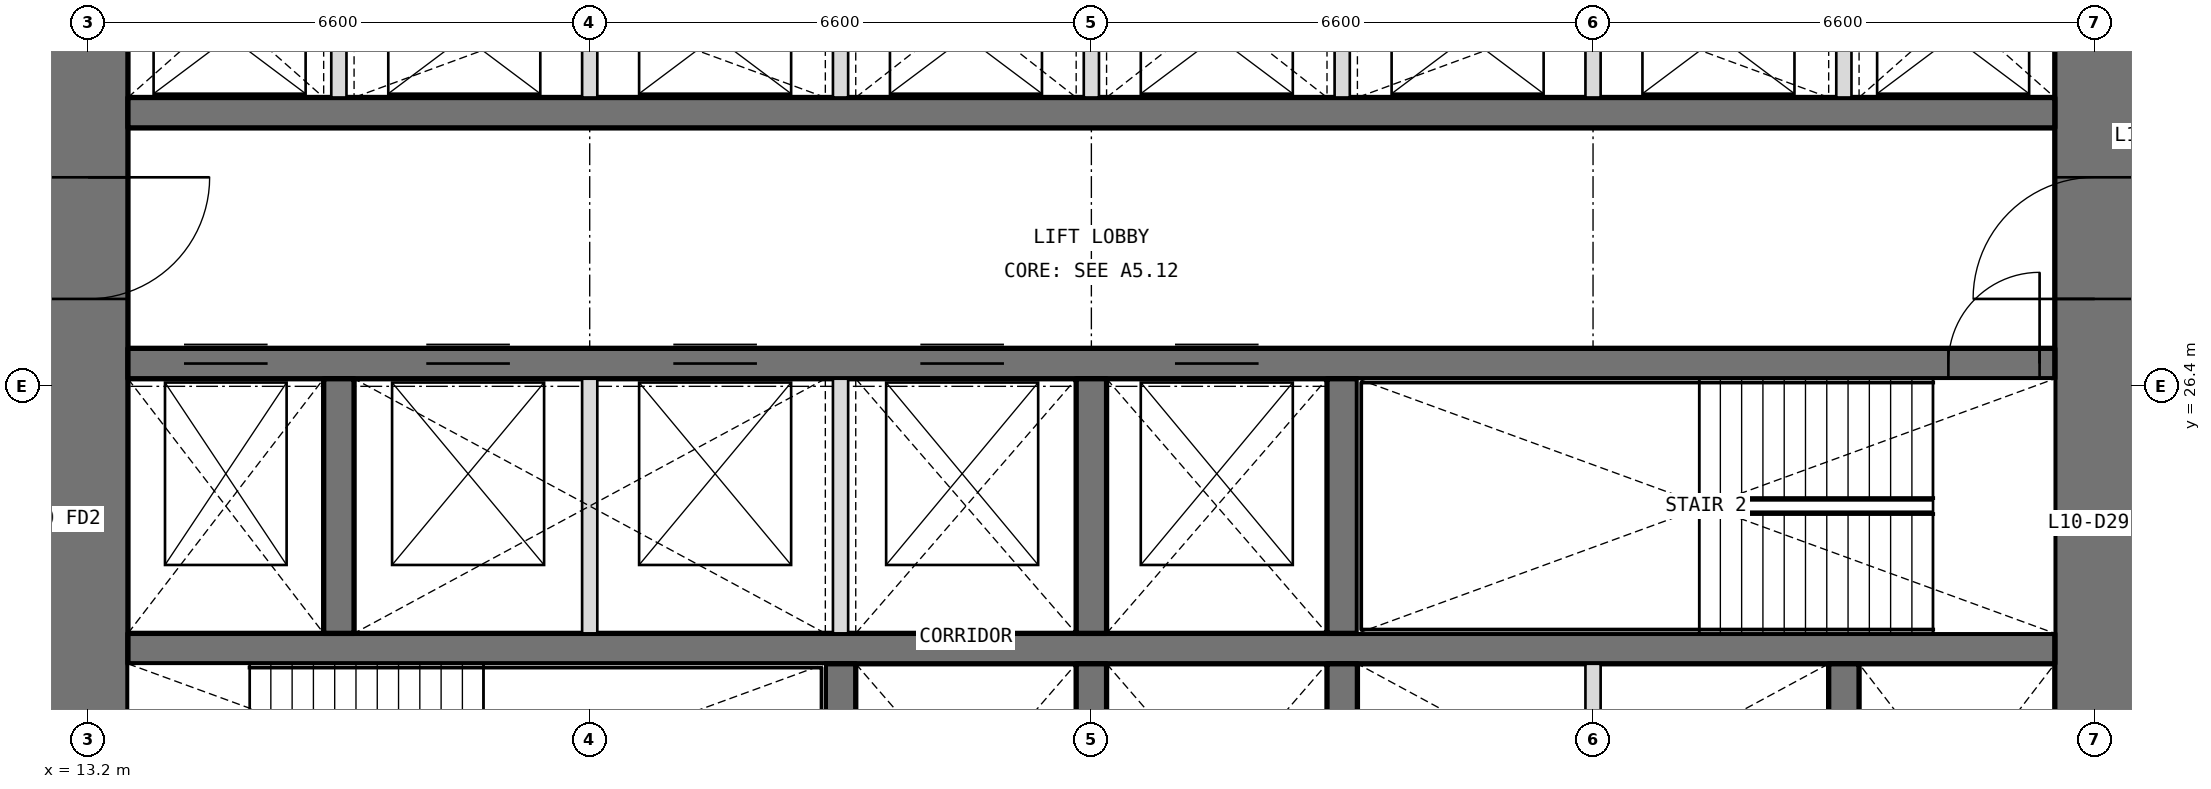
"""IFC4 building model, lengths in metres.
Left out: names, types, materials, properties, quantities, classifications, styles, units other than length and angle.
Written with IfcOpenShell. Run it as: python <this file> out.ifc"""

import sys

from ifc_helpers import new_model, si_unit, direction, frame, frame_2d, origin, place, context, subcontext, project, spatial, rectangle, extrude, element, fill, save


model = new_model("IFC4")
c1 = context("Model", 3, precision=1e-05, world=origin(), true_north=direction((0.0, 1.0)))
c2 = subcontext(c1, "Body", "Model", "MODEL_VIEW")
j1 = project(units=[si_unit("LENGTHUNIT", "METRE"), si_unit("PLANEANGLEUNIT", "RADIAN")], contexts=[c1])
p1 = place(None, origin())
s1 = spatial("IfcSite", under=j1, at=p1, CompositionType="ELEMENT")
p2 = place(p1, origin())
s2 = spatial("IfcBuilding", under=s1, at=p2, CompositionType="ELEMENT")
p3 = place(p2, frame((0.0, 0.0, 46.5)))
s3 = spatial("IfcBuildingStorey", under=s2, at=p3, CompositionType="ELEMENT", Elevation=46.5)
p4 = place(p3, frame((39.6, 13.725, 0.0), z_axis=(0.0, 0.0, 1.0), x_axis=(0.0, 1.0, 0.0)))
e1 = element("IfcWall", 1, at=p4, inside=s3, PredefinedType="SHEAR", context=c2, shape_type="SweptSolid", body=[
    extrude(rectangle(XDim=18.75, YDim=1.05, at=frame_2d((9.375, 0.0))), origin(), (0.0, 0.0, 1.0), 4.2),
])
p5 = place(p4, frame((3.025, 0.0, 0.0)))
e2 = element("IfcOpeningElement", 2, at=p5, cuts=e1, PredefinedType="OPENING", context=c2, shape_type="SweptSolid", body=[
    extrude(rectangle(XDim=1.6, YDim=2.1, at=frame_2d((0.8, 1.05))), frame((0.0, 0.535, 0.0), z_axis=(0.0, -1.0, 0.0), x_axis=(1.0, 0.0, 0.0)), (0.0, 0.0, 1.0), 1.07),
])
p6 = place(p4, frame((13.825, 0.0, 0.0)))
e3 = element("IfcOpeningElement", 3, at=p6, cuts=e1, PredefinedType="OPENING", context=c2, shape_type="SweptSolid", body=[
    extrude(rectangle(XDim=1.6, YDim=2.1, at=frame_2d((0.8, 1.05))), frame((0.0, 0.535, 0.0), z_axis=(0.0, -1.0, 0.0), x_axis=(1.0, 0.0, 0.0)), (0.0, 0.0, 1.0), 1.07),
])
p7 = place(p3, frame((13.2, 32.475, 0.0), z_axis=(0.0, 0.0, 1.0), x_axis=(0.0, -1.0, 0.0)))
e4 = element("IfcWall", 4, at=p7, inside=s3, PredefinedType="SHEAR", context=c2, shape_type="SweptSolid", body=[
    extrude(rectangle(XDim=18.75, YDim=1.05, at=frame_2d((9.375, 0.0))), origin(), (0.0, 0.0, 1.0), 4.2),
])
p8 = place(p7, frame((14.125, 0.0, 0.0)))
e5 = element("IfcOpeningElement", 5, at=p8, cuts=e4, PredefinedType="OPENING", context=c2, shape_type="SweptSolid", body=[
    extrude(rectangle(XDim=1.6, YDim=2.1, at=frame_2d((0.8, 1.05))), frame((0.0, 0.535, 0.0), z_axis=(0.0, -1.0, 0.0), x_axis=(1.0, 0.0, 0.0)), (0.0, 0.0, 1.0), 1.07),
])
p9 = place(p7, frame((3.325, 0.0, 0.0)))
e6 = element("IfcOpeningElement", 6, at=p9, cuts=e4, PredefinedType="OPENING", context=c2, shape_type="SweptSolid", body=[
    extrude(rectangle(XDim=1.6, YDim=2.1, at=frame_2d((0.8, 1.05))), frame((0.0, 0.535, 0.0), z_axis=(0.0, -1.0, 0.0), x_axis=(1.0, 0.0, 0.0)), (0.0, 0.0, 1.0), 1.07),
])
p10 = place(p3, frame((13.725, 22.95, 0.0), z_axis=(0.0, 0.0, 1.0), x_axis=(1.0, 0.0, 0.0)))
e7 = element("IfcWall", 7, at=p10, inside=s3, PredefinedType="SHEAR", context=c2, shape_type="SweptSolid", body=[
    extrude(rectangle(XDim=25.35, YDim=0.4, at=frame_2d((12.675, 0.0))), origin(), (0.0, 0.0, 1.0), 4.2),
])
p11 = place(p3, frame((13.725, 26.7, 0.0), z_axis=(0.0, 0.0, 1.0), x_axis=(1.0, 0.0, 0.0)))
e8 = element("IfcWall", 8, at=p11, inside=s3, PredefinedType="SHEAR", context=c2, shape_type="SweptSolid", body=[
    extrude(rectangle(XDim=25.35, YDim=0.4, at=frame_2d((12.675, 0.0))), origin(), (0.0, 0.0, 1.0), 4.2),
])
p12 = place(p11, frame((23.95, 0.0, 0.0)))
e9 = element("IfcOpeningElement", 9, at=p12, cuts=e8, PredefinedType="OPENING", context=c2, shape_type="SweptSolid", body=[
    extrude(rectangle(XDim=1.2, YDim=2.1, at=frame_2d((0.6, 1.05))), frame((0.0, 0.21, 0.0), z_axis=(0.0, -1.0, 0.0), x_axis=(1.0, 0.0, 0.0)), (0.0, 0.0, 1.0), 0.42),
])
p13 = place(p11, frame((0.738, 0.0, 0.0)))
e10 = element("IfcOpeningElement", 10, at=p13, cuts=e8, PredefinedType="OPENING", context=c2, shape_type="SweptSolid", body=[
    extrude(rectangle(XDim=1.1, YDim=2.1, at=frame_2d((0.55, 1.05))), frame((0.0, 0.21, 0.0), z_axis=(0.0, -1.0, 0.0), x_axis=(1.0, 0.0, 0.0)), (0.0, 0.0, 1.0), 0.42),
])
p14 = place(p11, frame((3.925, 0.0, 0.0)))
e11 = element("IfcOpeningElement", 11, at=p14, cuts=e8, PredefinedType="OPENING", context=c2, shape_type="SweptSolid", body=[
    extrude(rectangle(XDim=1.1, YDim=2.1, at=frame_2d((0.55, 1.05))), frame((0.0, 0.21, 0.0), z_axis=(0.0, -1.0, 0.0), x_axis=(1.0, 0.0, 0.0)), (0.0, 0.0, 1.0), 0.42),
])
p15 = place(p11, frame((7.175, 0.0, 0.0)))
e12 = element("IfcOpeningElement", 12, at=p15, cuts=e8, PredefinedType="OPENING", context=c2, shape_type="SweptSolid", body=[
    extrude(rectangle(XDim=1.1, YDim=2.1, at=frame_2d((0.55, 1.05))), frame((0.0, 0.21, 0.0), z_axis=(0.0, -1.0, 0.0), x_axis=(1.0, 0.0, 0.0)), (0.0, 0.0, 1.0), 0.42),
])
p16 = place(p11, frame((10.425, 0.0, 0.0)))
e13 = element("IfcOpeningElement", 13, at=p16, cuts=e8, PredefinedType="OPENING", context=c2, shape_type="SweptSolid", body=[
    extrude(rectangle(XDim=1.1, YDim=2.1, at=frame_2d((0.55, 1.05))), frame((0.0, 0.21, 0.0), z_axis=(0.0, -1.0, 0.0), x_axis=(1.0, 0.0, 0.0)), (0.0, 0.0, 1.0), 0.42),
])
p17 = place(p11, frame((13.775, 0.0, 0.0)))
e14 = element("IfcOpeningElement", 14, at=p17, cuts=e8, PredefinedType="OPENING", context=c2, shape_type="SweptSolid", body=[
    extrude(rectangle(XDim=1.1, YDim=2.1, at=frame_2d((0.55, 1.05))), frame((0.0, 0.21, 0.0), z_axis=(0.0, -1.0, 0.0), x_axis=(1.0, 0.0, 0.0)), (0.0, 0.0, 1.0), 0.42),
])
p18 = place(p3, frame((13.725, 30.0, 0.0), z_axis=(0.0, 0.0, 1.0), x_axis=(1.0, 0.0, 0.0)))
e15 = element("IfcWall", 15, at=p18, inside=s3, PredefinedType="SHEAR", context=c2, shape_type="SweptSolid", body=[
    extrude(rectangle(XDim=25.35, YDim=0.4, at=frame_2d((12.675, 0.0))), origin(), (0.0, 0.0, 1.0), 4.2),
])
for number, where, z_axis, x_axis in (
    (16, (23.1, 19.4, 0.0), (0.0, 0.0, 1.0), (0.0, 1.0, 0.0)),
    (17, (26.4, 19.4, 0.0), (0.0, 0.0, 1.0), (0.0, 1.0, 0.0)),
    (18, (29.7, 19.4, 0.0), (0.0, 0.0, 1.0), (0.0, 1.0, 0.0)),
    (19, (36.3, 19.4, 0.0), (0.0, 0.0, 1.0), (0.0, 1.0, 0.0)),
    (20, (16.5, 23.15, 0.0), (0.0, 0.0, 1.0), (0.0, 1.0, 0.0)),
    (21, (26.4, 23.15, 0.0), (0.0, 0.0, 1.0), (0.0, 1.0, 0.0)),
    (22, (29.7, 23.15, 0.0), (0.0, 0.0, 1.0), (0.0, 1.0, 0.0)),
):
    element("IfcWall", number, at=place(p3, frame(where, z_axis=z_axis, x_axis=x_axis)), inside=s3, PredefinedType="SHEAR", context=c2, shape_type="SweptSolid", body=[
        extrude(rectangle(XDim=3.35, YDim=0.4, at=frame_2d((1.675, 0.0))), origin(), (0.0, 0.0, 1.0), 4.2),
    ])
for number, where, z_axis, x_axis in (
    (23, (16.5, 30.2, 0.0), (0.0, 0.0, 1.0), (0.0, 1.0, 0.0)),
    (24, (19.8, 30.2, 0.0), (0.0, 0.0, 1.0), (0.0, 1.0, 0.0)),
    (25, (23.1, 30.2, 0.0), (0.0, 0.0, 1.0), (0.0, 1.0, 0.0)),
    (26, (26.4, 30.2, 0.0), (0.0, 0.0, 1.0), (0.0, 1.0, 0.0)),
    (27, (29.7, 30.2, 0.0), (0.0, 0.0, 1.0), (0.0, 1.0, 0.0)),
    (28, (33.0, 30.2, 0.0), (0.0, 0.0, 1.0), (0.0, 1.0, 0.0)),
    (29, (36.3, 30.2, 0.0), (0.0, 0.0, 1.0), (0.0, 1.0, 0.0)),
):
    element("IfcWall", number, at=place(p3, frame(where, z_axis=z_axis, x_axis=x_axis)), inside=s3, PredefinedType="PARTITIONING", context=c2, shape_type="SweptSolid", body=[
        extrude(rectangle(XDim=2.275, YDim=0.2, at=frame_2d((1.138, 0.0))), origin(), (0.0, 0.0, 1.0), 4.2),
    ])
for number, where, z_axis, x_axis in (
    (30, (33.0, 19.4, 0.0), (0.0, 0.0, 1.0), (0.0, 1.0, 0.0)),
    (31, (19.8, 23.15, 0.0), (0.0, 0.0, 1.0), (0.0, 1.0, 0.0)),
    (32, (23.1, 23.15, 0.0), (0.0, 0.0, 1.0), (0.0, 1.0, 0.0)),
):
    element("IfcWall", number, at=place(p3, frame(where, z_axis=z_axis, x_axis=x_axis)), inside=s3, PredefinedType="PARTITIONING", context=c2, shape_type="SweptSolid", body=[
        extrude(rectangle(XDim=3.35, YDim=0.2, at=frame_2d((1.675, 0.0))), origin(), (0.0, 0.0, 1.0), 4.2),
    ])
p19 = place(p12, origin())
e33 = element("IfcDoor", 33, at=p19, inside=s3, OperationType="SINGLE_SWING_RIGHT", PredefinedType="DOOR", context=c2, shape_type="SweptSolid", body=[
    extrude(rectangle(XDim=1.2, YDim=2.1, at=frame_2d((0.6, 1.05))), frame((0.0, 0.025, 0.0), z_axis=(0.0, -1.0, 0.0), x_axis=(1.0, 0.0, 0.0)), (0.0, 0.0, 1.0), 0.05),
])
fill(e9, e33)
p20 = place(p9, origin())
e34 = element("IfcDoor", 34, at=p20, inside=s3, OperationType="DOUBLE_DOOR_DOUBLE_SWING", PredefinedType="DOOR", context=c2, shape_type="SweptSolid", body=[
    extrude(rectangle(XDim=1.6, YDim=2.1, at=frame_2d((0.8, 1.05))), frame((0.0, 0.025, 0.0), z_axis=(0.0, -1.0, 0.0), x_axis=(1.0, 0.0, 0.0)), (0.0, 0.0, 1.0), 0.05),
])
fill(e6, e34)
p21 = place(p6, origin())
e35 = element("IfcDoor", 35, at=p21, inside=s3, OperationType="DOUBLE_DOOR_DOUBLE_SWING", PredefinedType="DOOR", context=c2, shape_type="SweptSolid", body=[
    extrude(rectangle(XDim=1.6, YDim=2.1, at=frame_2d((0.8, 1.05))), frame((0.0, 0.025, 0.0), z_axis=(0.0, -1.0, 0.0), x_axis=(1.0, 0.0, 0.0)), (0.0, 0.0, 1.0), 0.05),
])
fill(e3, e35)
p22 = place(p13, origin())
e36 = element("IfcDoor", 36, at=p22, inside=s3, OperationType="DOUBLE_DOOR_SLIDING", PredefinedType="DOOR", context=c2, shape_type="SweptSolid", body=[
    extrude(rectangle(XDim=1.1, YDim=2.1, at=frame_2d((0.55, 1.05))), frame((0.0, 0.025, 0.0), z_axis=(0.0, -1.0, 0.0), x_axis=(1.0, 0.0, 0.0)), (0.0, 0.0, 1.0), 0.05),
])
fill(e10, e36)
p23 = place(p14, origin())
e37 = element("IfcDoor", 37, at=p23, inside=s3, OperationType="DOUBLE_DOOR_SLIDING", PredefinedType="DOOR", context=c2, shape_type="SweptSolid", body=[
    extrude(rectangle(XDim=1.1, YDim=2.1, at=frame_2d((0.55, 1.05))), frame((0.0, 0.025, 0.0), z_axis=(0.0, -1.0, 0.0), x_axis=(1.0, 0.0, 0.0)), (0.0, 0.0, 1.0), 0.05),
])
fill(e11, e37)
p24 = place(p15, origin())
e38 = element("IfcDoor", 38, at=p24, inside=s3, OperationType="DOUBLE_DOOR_SLIDING", PredefinedType="DOOR", context=c2, shape_type="SweptSolid", body=[
    extrude(rectangle(XDim=1.1, YDim=2.1, at=frame_2d((0.55, 1.05))), frame((0.0, 0.025, 0.0), z_axis=(0.0, -1.0, 0.0), x_axis=(1.0, 0.0, 0.0)), (0.0, 0.0, 1.0), 0.05),
])
fill(e12, e38)
p25 = place(p16, origin())
e39 = element("IfcDoor", 39, at=p25, inside=s3, OperationType="DOUBLE_DOOR_SLIDING", PredefinedType="DOOR", context=c2, shape_type="SweptSolid", body=[
    extrude(rectangle(XDim=1.1, YDim=2.1, at=frame_2d((0.55, 1.05))), frame((0.0, 0.025, 0.0), z_axis=(0.0, -1.0, 0.0), x_axis=(1.0, 0.0, 0.0)), (0.0, 0.0, 1.0), 0.05),
])
fill(e13, e39)
p26 = place(p17, origin())
e40 = element("IfcDoor", 40, at=p26, inside=s3, OperationType="DOUBLE_DOOR_SLIDING", PredefinedType="DOOR", context=c2, shape_type="SweptSolid", body=[
    extrude(rectangle(XDim=1.1, YDim=2.1, at=frame_2d((0.55, 1.05))), frame((0.0, 0.025, 0.0), z_axis=(0.0, -1.0, 0.0), x_axis=(1.0, 0.0, 0.0)), (0.0, 0.0, 1.0), 0.05),
])
fill(e14, e40)
save(model, sys.argv[1])
